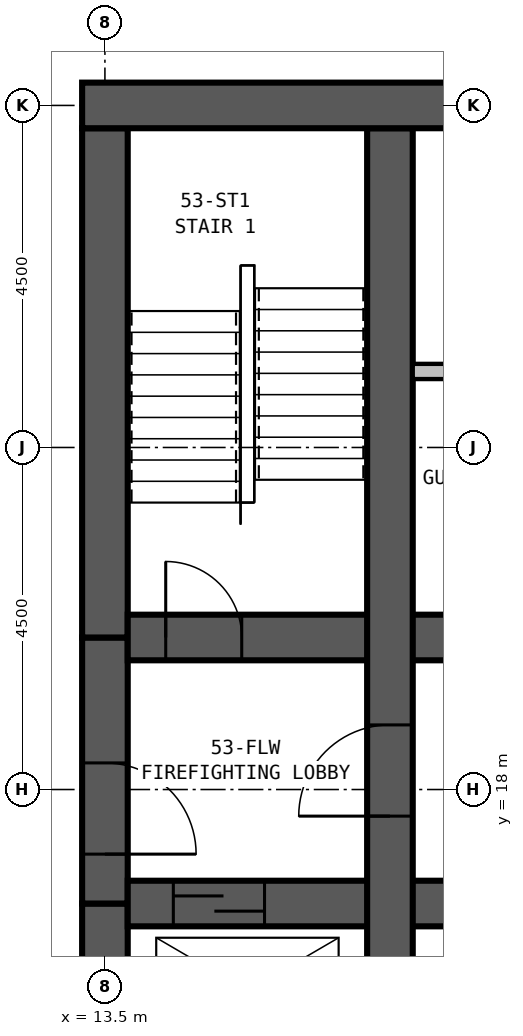
"""IFC4 building model, lengths in metres.
Left out: names, types, materials, properties, quantities, classifications, styles, units other than length and angle.
Written with IfcOpenShell. Run it as: python <this file> out.ifc"""

import sys

from ifc_helpers import new_model, si_unit, direction, frame, frame_2d, origin, place, context, subcontext, project, spatial, rectangle, extrude, element, fill, save


model = new_model("IFC4")
c1 = context("Model", 3, precision=1e-05, world=origin(), true_north=direction((0.0, 1.0)))
c2 = subcontext(c1, "Body", "Model", "MODEL_VIEW")
j1 = project(units=[si_unit("LENGTHUNIT", "METRE"), si_unit("PLANEANGLEUNIT", "RADIAN")], contexts=[c1])
p1 = place(None, origin())
s1 = spatial("IfcSite", under=j1, at=p1, CompositionType="ELEMENT")
p2 = place(p1, origin())
s2 = spatial("IfcBuilding", under=s1, at=p2, CompositionType="ELEMENT")
p3 = place(p2, frame((0.0, 0.0, 204.4)))
s3 = spatial("IfcBuildingStorey", under=s2, at=p3, CompositionType="ELEMENT", Elevation=204.4)
p4 = place(p3, frame((36.3, 27.0, 0.0), z_axis=(0.0, 0.0, 1.0), x_axis=(-1.0, 0.0, 0.0)))
e1 = element("IfcWall", 1, at=p4, inside=s3, PredefinedType="SHEAR", context=c2, shape_type="SweptSolid", body=[
    extrude(rectangle(XDim=23.1, YDim=0.6, at=frame_2d((11.55, 0.0))), origin(), (0.0, 0.0, 1.0), 3.5),
])
p5 = place(p4, frame((17.05, 0.0, 0.0)))
e2 = element("IfcOpeningElement", 2, at=p5, cuts=e1, PredefinedType="OPENING", context=c2, shape_type="SweptSolid", body=[
    extrude(rectangle(XDim=1.0, YDim=2.1, at=frame_2d((0.5, 1.05))), frame((0.0, 0.31, 0.0), z_axis=(0.0, -1.0, 0.0), x_axis=(1.0, 0.0, 0.0)), (0.0, 0.0, 1.0), 0.62),
])
p6 = place(p4, frame((12.05, 0.0, 0.0)))
e3 = element("IfcOpeningElement", 3, at=p6, cuts=e1, PredefinedType="OPENING", context=c2, shape_type="SweptSolid", body=[
    extrude(rectangle(XDim=1.0, YDim=2.1, at=frame_2d((0.5, 1.05))), frame((0.0, 0.31, 0.0), z_axis=(0.0, -1.0, 0.0), x_axis=(1.0, 0.0, 0.0)), (0.0, 0.0, 1.0), 0.62),
])
p7 = place(p4, frame((7.05, 0.0, 0.0)))
e4 = element("IfcOpeningElement", 4, at=p7, cuts=e1, PredefinedType="OPENING", context=c2, shape_type="SweptSolid", body=[
    extrude(rectangle(XDim=1.0, YDim=2.1, at=frame_2d((0.5, 1.05))), frame((0.0, 0.31, 0.0), z_axis=(0.0, -1.0, 0.0), x_axis=(1.0, 0.0, 0.0)), (0.0, 0.0, 1.0), 0.62),
])
p8 = place(p3, frame((17.25, 13.8, 0.0), z_axis=(0.0, 0.0, 1.0), x_axis=(0.0, 1.0, 0.0)))
e5 = element("IfcWall", 5, at=p8, inside=s3, PredefinedType="SHEAR", context=c2, shape_type="SweptSolid", body=[
    extrude(rectangle(XDim=12.9, YDim=0.6, at=frame_2d((6.45, 0.0))), origin(), (0.0, 0.0, 1.0), 3.5),
])
p9 = place(p8, frame((3.85, 0.0, 0.0)))
e6 = element("IfcOpeningElement", 6, at=p9, cuts=e5, PredefinedType="OPENING", context=c2, shape_type="SweptSolid", body=[
    extrude(rectangle(XDim=1.2, YDim=2.1, at=frame_2d((0.6, 1.05))), frame((0.0, 0.31, 0.0), z_axis=(0.0, -1.0, 0.0), x_axis=(1.0, 0.0, 0.0)), (0.0, 0.0, 1.0), 0.62),
])
p10 = place(p3, frame((13.8, 16.5, 0.0), z_axis=(0.0, 0.0, 1.0), x_axis=(1.0, 0.0, 0.0)))
e7 = element("IfcWall", 7, at=p10, inside=s3, PredefinedType="SHEAR", context=c2, shape_type="SweptSolid", body=[
    extrude(rectangle(XDim=21.9, YDim=0.6, at=frame_2d((10.95, 0.0))), origin(), (0.0, 0.0, 1.0), 3.5),
])
p11 = place(p10, frame((5.75, 0.0, 0.0), z_axis=(0.0, 0.0, 1.0), x_axis=(-1.0, 0.0, 0.0)))
e8 = element("IfcOpeningElement", 8, at=p11, cuts=e7, PredefinedType="OPENING", context=c2, shape_type="SweptSolid", body=[
    extrude(rectangle(XDim=1.0, YDim=2.1, at=frame_2d((0.5, 1.05))), frame((0.0, 0.31, 0.0), z_axis=(0.0, -1.0, 0.0), x_axis=(1.0, 0.0, 0.0)), (0.0, 0.0, 1.0), 0.62),
])
p12 = place(p10, frame((10.2, 0.0, 0.0), z_axis=(0.0, 0.0, 1.0), x_axis=(-1.0, 0.0, 0.0)))
e9 = element("IfcOpeningElement", 9, at=p12, cuts=e7, PredefinedType="OPENING", context=c2, shape_type="SweptSolid", body=[
    extrude(rectangle(XDim=1.0, YDim=2.1, at=frame_2d((0.5, 1.05))), frame((0.0, 0.31, 0.0), z_axis=(0.0, -1.0, 0.0), x_axis=(1.0, 0.0, 0.0)), (0.0, 0.0, 1.0), 0.62),
])
p13 = place(p10, frame((12.7, 0.0, 0.0), z_axis=(0.0, 0.0, 1.0), x_axis=(-1.0, 0.0, 0.0)))
e10 = element("IfcOpeningElement", 10, at=p13, cuts=e7, PredefinedType="OPENING", context=c2, shape_type="SweptSolid", body=[
    extrude(rectangle(XDim=1.0, YDim=2.1, at=frame_2d((0.5, 1.05))), frame((0.0, 0.31, 0.0), z_axis=(0.0, -1.0, 0.0), x_axis=(1.0, 0.0, 0.0)), (0.0, 0.0, 1.0), 0.62),
])
p14 = place(p10, frame((17.15, 0.0, 0.0), z_axis=(0.0, 0.0, 1.0), x_axis=(-1.0, 0.0, 0.0)))
e11 = element("IfcOpeningElement", 11, at=p14, cuts=e7, PredefinedType="OPENING", context=c2, shape_type="SweptSolid", body=[
    extrude(rectangle(XDim=1.0, YDim=2.1, at=frame_2d((0.5, 1.05))), frame((0.0, 0.31, 0.0), z_axis=(0.0, -1.0, 0.0), x_axis=(1.0, 0.0, 0.0)), (0.0, 0.0, 1.0), 0.62),
])
p15 = place(p10, frame((0.6, 0.0, 0.0)))
e12 = element("IfcOpeningElement", 12, at=p15, cuts=e7, PredefinedType="OPENING", context=c2, shape_type="SweptSolid", body=[
    extrude(rectangle(XDim=1.2, YDim=2.1, at=frame_2d((0.6, 1.05))), frame((0.0, 0.31, 0.0), z_axis=(0.0, -1.0, 0.0), x_axis=(1.0, 0.0, 0.0)), (0.0, 0.0, 1.0), 0.62),
])
p16 = place(p10, frame((19.6, 0.0, 0.0)))
e13 = element("IfcOpeningElement", 13, at=p16, cuts=e7, PredefinedType="OPENING", context=c2, shape_type="SweptSolid", body=[
    extrude(rectangle(XDim=1.2, YDim=2.1, at=frame_2d((0.6, 1.05))), frame((0.0, 0.31, 0.0), z_axis=(0.0, -1.0, 0.0), x_axis=(1.0, 0.0, 0.0)), (0.0, 0.0, 1.0), 0.62),
])
p17 = place(p3, frame((13.8, 20.0, 0.0), z_axis=(0.0, 0.0, 1.0), x_axis=(1.0, 0.0, 0.0)))
e14 = element("IfcWall", 14, at=p17, inside=s3, PredefinedType="SHEAR", context=c2, shape_type="SweptSolid", body=[
    extrude(rectangle(XDim=21.9, YDim=0.6, at=frame_2d((10.95, 0.0))), origin(), (0.0, 0.0, 1.0), 3.5),
])
p18 = place(p17, frame((0.5, 0.0, 0.0)))
e15 = element("IfcOpeningElement", 15, at=p18, cuts=e14, PredefinedType="OPENING", context=c2, shape_type="SweptSolid", body=[
    extrude(rectangle(XDim=1.0, YDim=2.1, at=frame_2d((0.5, 1.05))), frame((0.0, 0.31, 0.0), z_axis=(0.0, -1.0, 0.0), x_axis=(1.0, 0.0, 0.0)), (0.0, 0.0, 1.0), 0.62),
])
p19 = place(p17, frame((20.5, 0.0, 0.0)))
e16 = element("IfcOpeningElement", 16, at=p19, cuts=e14, PredefinedType="OPENING", context=c2, shape_type="SweptSolid", body=[
    extrude(rectangle(XDim=1.0, YDim=2.1, at=frame_2d((0.5, 1.05))), frame((0.0, 0.31, 0.0), z_axis=(0.0, -1.0, 0.0), x_axis=(1.0, 0.0, 0.0)), (0.0, 0.0, 1.0), 0.62),
])
p20 = place(p17, frame((9.15, 0.0, 0.0)))
e17 = element("IfcOpeningElement", 17, at=p20, cuts=e14, PredefinedType="OPENING", context=c2, shape_type="SweptSolid", body=[
    extrude(rectangle(XDim=1.1, YDim=2.1, at=frame_2d((0.55, 1.05))), frame((0.0, 0.31, 0.0), z_axis=(0.0, -1.0, 0.0), x_axis=(1.0, 0.0, 0.0)), (0.0, 0.0, 1.0), 0.62),
])
p21 = place(p17, frame((11.65, 0.0, 0.0)))
e18 = element("IfcOpeningElement", 18, at=p21, cuts=e14, PredefinedType="OPENING", context=c2, shape_type="SweptSolid", body=[
    extrude(rectangle(XDim=1.1, YDim=2.1, at=frame_2d((0.55, 1.05))), frame((0.0, 0.31, 0.0), z_axis=(0.0, -1.0, 0.0), x_axis=(1.0, 0.0, 0.0)), (0.0, 0.0, 1.0), 0.62),
])
p22 = place(p17, frame((14.15, 0.0, 0.0)))
e19 = element("IfcOpeningElement", 19, at=p22, cuts=e14, PredefinedType="OPENING", context=c2, shape_type="SweptSolid", body=[
    extrude(rectangle(XDim=1.1, YDim=2.1, at=frame_2d((0.55, 1.05))), frame((0.0, 0.31, 0.0), z_axis=(0.0, -1.0, 0.0), x_axis=(1.0, 0.0, 0.0)), (0.0, 0.0, 1.0), 0.62),
])
p23 = place(p17, frame((16.65, 0.0, 0.0)))
e20 = element("IfcOpeningElement", 20, at=p23, cuts=e14, PredefinedType="OPENING", context=c2, shape_type="SweptSolid", body=[
    extrude(rectangle(XDim=1.1, YDim=2.1, at=frame_2d((0.55, 1.05))), frame((0.0, 0.31, 0.0), z_axis=(0.0, -1.0, 0.0), x_axis=(1.0, 0.0, 0.0)), (0.0, 0.0, 1.0), 0.62),
])
p24 = place(p17, frame((4.75, 0.0, 0.0)))
e21 = element("IfcOpeningElement", 21, at=p24, cuts=e14, PredefinedType="OPENING", context=c2, shape_type="SweptSolid", body=[
    extrude(rectangle(XDim=1.0, YDim=2.1, at=frame_2d((0.5, 1.05))), frame((0.0, 0.31, 0.0), z_axis=(0.0, -1.0, 0.0), x_axis=(1.0, 0.0, 0.0)), (0.0, 0.0, 1.0), 0.62),
])
p25 = place(p17, frame((6.7, 0.0, 0.0)))
e22 = element("IfcOpeningElement", 22, at=p25, cuts=e14, PredefinedType="OPENING", context=c2, shape_type="SweptSolid", body=[
    extrude(rectangle(XDim=1.0, YDim=2.1, at=frame_2d((0.5, 1.05))), frame((0.0, 0.31, 0.0), z_axis=(0.0, -1.0, 0.0), x_axis=(1.0, 0.0, 0.0)), (0.0, 0.0, 1.0), 0.62),
])
p26 = place(p3, frame((13.5, 26.7, 0.0), z_axis=(0.0, 0.0, 1.0), x_axis=(0.0, -1.0, 0.0)))
e23 = element("IfcWall", 23, at=p26, inside=s3, PredefinedType="SHEAR", context=c2, shape_type="SweptSolid", body=[
    extrude(rectangle(XDim=6.7, YDim=0.6, at=frame_2d((3.35, 0.0))), origin(), (0.0, 0.0, 1.0), 3.5),
])
p27 = place(p3, frame((13.5, 20.0, 0.0), z_axis=(0.0, 0.0, 1.0), x_axis=(0.0, -1.0, 0.0)))
e24 = element("IfcWall", 24, at=p27, inside=s3, PredefinedType="SHEAR", context=c2, shape_type="SweptSolid", body=[
    extrude(rectangle(XDim=3.5, YDim=0.6, at=frame_2d((1.75, 0.0))), origin(), (0.0, 0.0, 1.0), 3.5),
])
p28 = place(p27, frame((1.65, 0.0, 0.0)))
e25 = element("IfcOpeningElement", 25, at=p28, cuts=e24, PredefinedType="OPENING", context=c2, shape_type="SweptSolid", body=[
    extrude(rectangle(XDim=1.2, YDim=2.1, at=frame_2d((0.6, 1.05))), frame((0.0, 0.31, 0.0), z_axis=(0.0, -1.0, 0.0), x_axis=(1.0, 0.0, 0.0)), (0.0, 0.0, 1.0), 0.62),
])
p29 = place(p3, frame((13.5, 16.5, 0.0), z_axis=(0.0, 0.0, 1.0), x_axis=(0.0, -1.0, 0.0)))
e26 = element("IfcWall", 26, at=p29, inside=s3, PredefinedType="SHEAR", context=c2, shape_type="SweptSolid", body=[
    extrude(rectangle(XDim=2.7, YDim=0.6, at=frame_2d((1.35, 0.0))), origin(), (0.0, 0.0, 1.0), 3.5),
])
p30 = place(p3, frame((17.55, 23.5, 0.0), z_axis=(0.0, 0.0, 1.0), x_axis=(1.0, 0.0, 0.0)))
e27 = element("IfcWall", 27, at=p30, inside=s3, PredefinedType="PARTITIONING", context=c2, shape_type="SweptSolid", body=[
    extrude(rectangle(XDim=14.4, YDim=0.2, at=frame_2d((7.2, 0.0))), origin(), (0.0, 0.0, 1.0), 3.25),
])
p31 = place(p28, origin())
e28 = element("IfcDoor", 28, at=p31, inside=s3, OperationType="SINGLE_SWING_RIGHT", PredefinedType="DOOR", context=c2, shape_type="SweptSolid", body=[
    extrude(rectangle(XDim=1.2, YDim=2.1, at=frame_2d((0.6, 1.05))), frame((0.0, 0.3, 0.0), z_axis=(0.0, -1.0, 0.0), x_axis=(1.0, 0.0, 0.0)), (0.0, 0.0, 1.0), 0.6),
])
fill(e25, e28)
p32 = place(p9, origin())
e29 = element("IfcDoor", 29, at=p32, inside=s3, OperationType="SINGLE_SWING_LEFT", PredefinedType="DOOR", context=c2, shape_type="SweptSolid", body=[
    extrude(rectangle(XDim=1.2, YDim=2.1, at=frame_2d((0.6, 1.05))), frame((0.0, 0.3, 0.0), z_axis=(0.0, -1.0, 0.0), x_axis=(1.0, 0.0, 0.0)), (0.0, 0.0, 1.0), 0.6),
])
fill(e6, e29)
p33 = place(p18, origin())
e30 = element("IfcDoor", 30, at=p33, inside=s3, OperationType="SINGLE_SWING_LEFT", PredefinedType="DOOR", context=c2, shape_type="SweptSolid", body=[
    extrude(rectangle(XDim=1.0, YDim=2.1, at=frame_2d((0.5, 1.05))), frame((0.0, 0.3, 0.0), z_axis=(0.0, -1.0, 0.0), x_axis=(1.0, 0.0, 0.0)), (0.0, 0.0, 1.0), 0.6),
])
fill(e15, e30)
p34 = place(p15, origin())
e31 = element("IfcDoor", 31, at=p34, inside=s3, OperationType="SLIDING_TO_LEFT", PredefinedType="DOOR", context=c2, shape_type="SweptSolid", body=[
    extrude(rectangle(XDim=1.2, YDim=2.1, at=frame_2d((0.6, 1.05))), frame((0.0, 0.3, 0.0), z_axis=(0.0, -1.0, 0.0), x_axis=(1.0, 0.0, 0.0)), (0.0, 0.0, 1.0), 0.6),
])
fill(e12, e31)
save(model, sys.argv[1])
